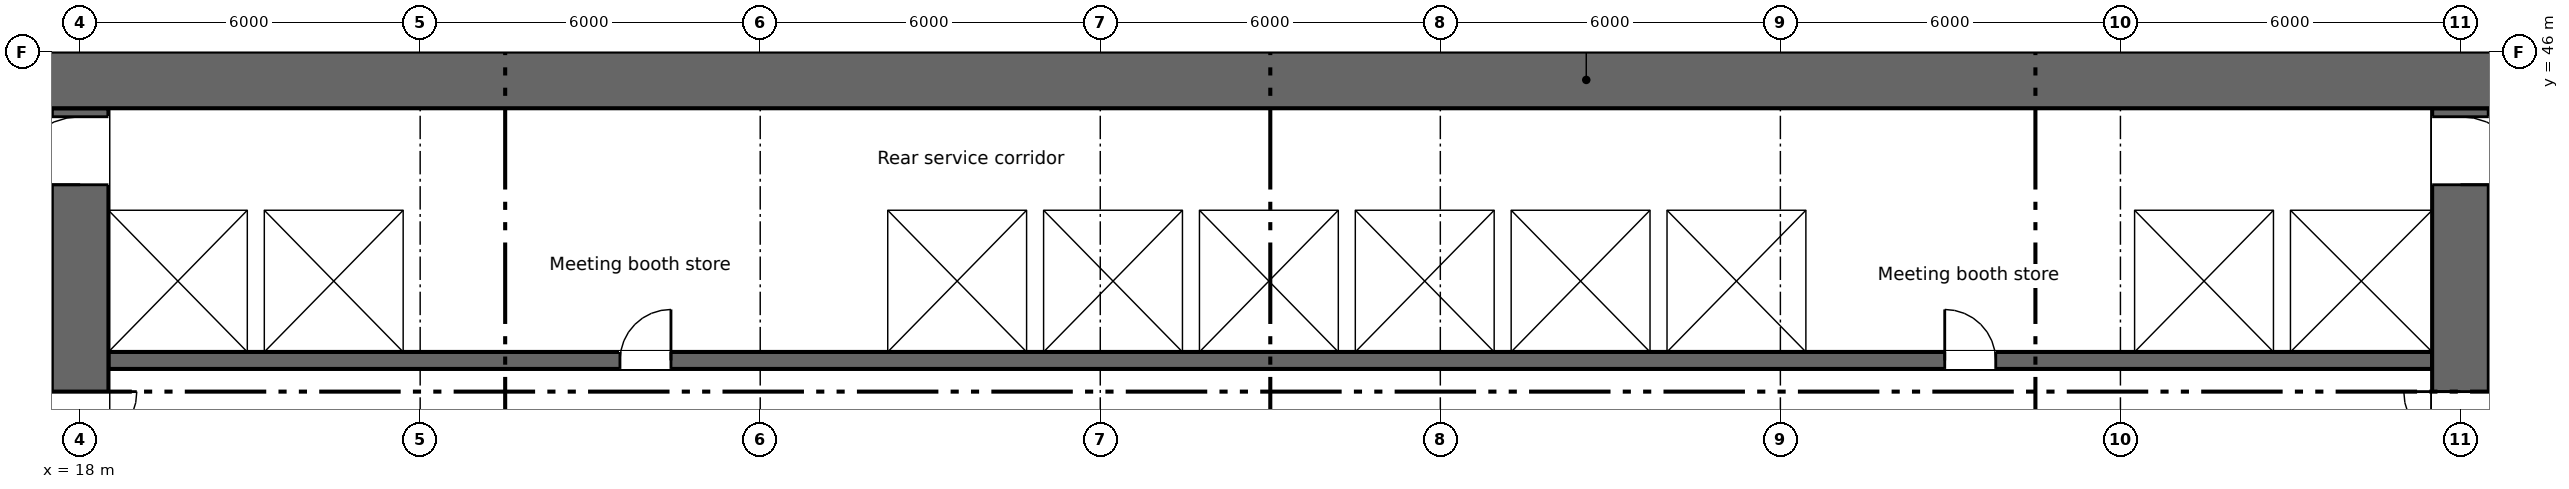
"""IFC4 building model, lengths in metres.
Left out: names, types, materials, properties, quantities, classifications, styles, units other than length and angle.
Written with IfcOpenShell. Run it as: python <this file> out.ifc"""

import sys

from ifc_helpers import new_model, si_unit, direction, frame, frame_2d, origin, place, context, subcontext, project, spatial, rectangle, extrude, element, fill, save


model = new_model("IFC4")
c1 = context("Model", 3, precision=1e-05, world=origin(), true_north=direction((0.0, 1.0)))
c2 = subcontext(c1, "Body", "Model", "MODEL_VIEW")
j1 = project(units=[si_unit("LENGTHUNIT", "METRE"), si_unit("PLANEANGLEUNIT", "RADIAN")], contexts=[c1])
p1 = place(None, origin())
s1 = spatial("IfcSite", under=j1, at=p1, CompositionType="ELEMENT")
p2 = place(p1, origin())
s2 = spatial("IfcBuilding", under=s1, at=p2, CompositionType="ELEMENT")
p3 = place(p2, frame((0.0, 0.0, 71.25)))
s3 = spatial("IfcBuildingStorey", under=s2, at=p3, CompositionType="ELEMENT", Elevation=71.25)
p4 = place(p3, frame((5.55, 45.5, 0.0), z_axis=(0.0, 0.0, 1.0), x_axis=(1.0, 0.0, 0.0)))
e1 = element("IfcWall", 1, at=p4, inside=s3, PredefinedType="SHEAR", context=c2, shape_type="SweptSolid", body=[
    extrude(rectangle(XDim=66.9, YDim=1.0, at=frame_2d((33.45, 0.0))), origin(), (0.0, 0.0, 1.0), 3.35),
])
p5 = place(p4, frame((1.2, 0.0, 0.6)))
e2 = element("IfcOpeningElement", 2, at=p5, cuts=e1, PredefinedType="OPENING", context=c2, shape_type="SweptSolid", body=[
    extrude(rectangle(XDim=0.6, YDim=2.4, at=frame_2d((0.3, 1.2))), frame((0.0, 0.51, 0.0), z_axis=(0.0, -1.0, 0.0), x_axis=(1.0, 0.0, 0.0)), (0.0, 0.0, 1.0), 1.02),
])
p6 = place(p4, frame((7.2, 0.0, 0.6)))
e3 = element("IfcOpeningElement", 3, at=p6, cuts=e1, PredefinedType="OPENING", context=c2, shape_type="SweptSolid", body=[
    extrude(rectangle(XDim=0.6, YDim=2.4, at=frame_2d((0.3, 1.2))), frame((0.0, 0.51, 0.0), z_axis=(0.0, -1.0, 0.0), x_axis=(1.0, 0.0, 0.0)), (0.0, 0.0, 1.0), 1.02),
])
p7 = place(p4, frame((61.2, 0.0, 0.6)))
e4 = element("IfcOpeningElement", 4, at=p7, cuts=e1, PredefinedType="OPENING", context=c2, shape_type="SweptSolid", body=[
    extrude(rectangle(XDim=0.6, YDim=2.4, at=frame_2d((0.3, 1.2))), frame((0.0, 0.51, 0.0), z_axis=(0.0, -1.0, 0.0), x_axis=(1.0, 0.0, 0.0)), (0.0, 0.0, 1.0), 1.02),
])
p8 = place(p3, frame((18.0, 28.4, 0.0), z_axis=(0.0, 0.0, 1.0), x_axis=(0.0, 1.0, 0.0)))
e5 = element("IfcWall", 5, at=p8, inside=s3, PredefinedType="SHEAR", context=c2, shape_type="SweptSolid", body=[
    extrude(rectangle(XDim=16.6, YDim=1.0, at=frame_2d((8.3, 0.0))), origin(), (0.0, 0.0, 1.0), 3.35),
])
p9 = place(p8, frame((9.6, 0.0, 0.0)))
e6 = element("IfcOpeningElement", 6, at=p9, cuts=e5, PredefinedType="OPENING", context=c2, shape_type="SweptSolid", body=[
    extrude(rectangle(XDim=2.0, YDim=2.1, at=frame_2d((1.0, 1.05))), frame((0.0, 0.51, 0.0), z_axis=(0.0, -1.0, 0.0), x_axis=(1.0, 0.0, 0.0)), (0.0, 0.0, 1.0), 1.02),
])
p10 = place(p8, frame((15.25, 0.0, 0.0)))
e7 = element("IfcOpeningElement", 7, at=p10, cuts=e5, PredefinedType="OPENING", context=c2, shape_type="SweptSolid", body=[
    extrude(rectangle(XDim=1.2, YDim=2.1, at=frame_2d((0.6, 1.05))), frame((0.0, 0.51, 0.0), z_axis=(0.0, -1.0, 0.0), x_axis=(1.0, 0.0, 0.0)), (0.0, 0.0, 1.0), 1.02),
])
p11 = place(p3, frame((60.0, 28.4, 0.0), z_axis=(0.0, 0.0, 1.0), x_axis=(0.0, 1.0, 0.0)))
e8 = element("IfcWall", 8, at=p11, inside=s3, PredefinedType="SHEAR", context=c2, shape_type="SweptSolid", body=[
    extrude(rectangle(XDim=16.6, YDim=1.0, at=frame_2d((8.3, 0.0))), origin(), (0.0, 0.0, 1.0), 3.35),
])
p12 = place(p11, frame((9.6, 0.0, 0.0)))
e9 = element("IfcOpeningElement", 9, at=p12, cuts=e8, PredefinedType="OPENING", context=c2, shape_type="SweptSolid", body=[
    extrude(rectangle(XDim=2.0, YDim=2.1, at=frame_2d((1.0, 1.05))), frame((0.0, 0.51, 0.0), z_axis=(0.0, -1.0, 0.0), x_axis=(1.0, 0.0, 0.0)), (0.0, 0.0, 1.0), 1.02),
])
p13 = place(p11, frame((15.25, 0.0, 0.0)))
e10 = element("IfcOpeningElement", 10, at=p13, cuts=e8, PredefinedType="OPENING", context=c2, shape_type="SweptSolid", body=[
    extrude(rectangle(XDim=1.2, YDim=2.1, at=frame_2d((0.6, 1.05))), frame((0.0, 0.51, 0.0), z_axis=(0.0, -1.0, 0.0), x_axis=(1.0, 0.0, 0.0)), (0.0, 0.0, 1.0), 1.02),
])
p14 = place(p3, frame((18.5, 40.55, 0.0), z_axis=(0.0, 0.0, 1.0), x_axis=(1.0, 0.0, 0.0)))
e11 = element("IfcWall", 11, at=p14, inside=s3, PredefinedType="SHEAR", context=c2, shape_type="SweptSolid", body=[
    extrude(rectangle(XDim=41.0, YDim=0.3, at=frame_2d((20.5, 0.0))), origin(), (0.0, 0.0, 1.0), 3.35),
])
p15 = place(p14, frame((9.025, 0.0, 0.0)))
e12 = element("IfcOpeningElement", 12, at=p15, cuts=e11, PredefinedType="OPENING", context=c2, shape_type="SweptSolid", body=[
    extrude(rectangle(XDim=0.9, YDim=2.1, at=frame_2d((0.45, 1.05))), frame((0.0, 0.16, 0.0), z_axis=(0.0, -1.0, 0.0), x_axis=(1.0, 0.0, 0.0)), (0.0, 0.0, 1.0), 0.32),
])
p16 = place(p14, frame((32.4, 0.0, 0.0)))
e13 = element("IfcOpeningElement", 13, at=p16, cuts=e11, PredefinedType="OPENING", context=c2, shape_type="SweptSolid", body=[
    extrude(rectangle(XDim=0.9, YDim=2.1, at=frame_2d((0.45, 1.05))), frame((0.0, 0.16, 0.0), z_axis=(0.0, -1.0, 0.0), x_axis=(1.0, 0.0, 0.0)), (0.0, 0.0, 1.0), 0.32),
])
p17 = place(p14, frame((14.425, 0.0, 0.0)))
e14 = element("IfcOpeningElement", 14, at=p17, cuts=e11, PredefinedType="OPENING", context=c2, shape_type="SweptSolid", body=[
    extrude(rectangle(XDim=1.1, YDim=2.1, at=frame_2d((0.55, 1.05))), frame((0.0, 0.16, 0.0), z_axis=(0.0, -1.0, 0.0), x_axis=(1.0, 0.0, 0.0)), (0.0, 0.0, 1.0), 0.32),
])
p18 = place(p14, frame((17.175, 0.0, 0.0)))
e15 = element("IfcOpeningElement", 15, at=p18, cuts=e11, PredefinedType="OPENING", context=c2, shape_type="SweptSolid", body=[
    extrude(rectangle(XDim=1.1, YDim=2.1, at=frame_2d((0.55, 1.05))), frame((0.0, 0.16, 0.0), z_axis=(0.0, -1.0, 0.0), x_axis=(1.0, 0.0, 0.0)), (0.0, 0.0, 1.0), 0.32),
])
p19 = place(p14, frame((19.925, 0.0, 0.0)))
e16 = element("IfcOpeningElement", 16, at=p19, cuts=e11, PredefinedType="OPENING", context=c2, shape_type="SweptSolid", body=[
    extrude(rectangle(XDim=1.1, YDim=2.1, at=frame_2d((0.55, 1.05))), frame((0.0, 0.16, 0.0), z_axis=(0.0, -1.0, 0.0), x_axis=(1.0, 0.0, 0.0)), (0.0, 0.0, 1.0), 0.32),
])
p20 = place(p14, frame((22.675, 0.0, 0.0)))
e17 = element("IfcOpeningElement", 17, at=p20, cuts=e11, PredefinedType="OPENING", context=c2, shape_type="SweptSolid", body=[
    extrude(rectangle(XDim=1.1, YDim=2.1, at=frame_2d((0.55, 1.05))), frame((0.0, 0.16, 0.0), z_axis=(0.0, -1.0, 0.0), x_axis=(1.0, 0.0, 0.0)), (0.0, 0.0, 1.0), 0.32),
])
p21 = place(p14, frame((36.375, 0.0, 0.0)))
e18 = element("IfcOpeningElement", 18, at=p21, cuts=e11, PredefinedType="OPENING", context=c2, shape_type="SweptSolid", body=[
    extrude(rectangle(XDim=1.2, YDim=2.1, at=frame_2d((0.6, 1.05))), frame((0.0, 0.16, 0.0), z_axis=(0.0, -1.0, 0.0), x_axis=(1.0, 0.0, 0.0)), (0.0, 0.0, 1.0), 0.32),
])
p22 = place(p14, frame((39.15, 0.0, 0.0)))
e19 = element("IfcOpeningElement", 19, at=p22, cuts=e11, PredefinedType="OPENING", context=c2, shape_type="SweptSolid", body=[
    extrude(rectangle(XDim=1.2, YDim=2.1, at=frame_2d((0.6, 1.05))), frame((0.0, 0.16, 0.0), z_axis=(0.0, -1.0, 0.0), x_axis=(1.0, 0.0, 0.0)), (0.0, 0.0, 1.0), 0.32),
])
p23 = place(p3, frame((18.5, 43.35, 0.0), z_axis=(0.0, 0.0, 1.0), x_axis=(1.0, 0.0, 0.0)))
e20 = element("IfcWall", 20, at=p23, inside=s3, PredefinedType="SHEAR", context=c2, shape_type="SweptSolid", body=[
    extrude(rectangle(XDim=41.0, YDim=0.3, at=frame_2d((20.5, 0.0))), origin(), (0.0, 0.0, 1.0), 3.35),
])
for number, where, z_axis, x_axis in (
    (21, (21.1, 40.7, 0.0), (0.0, 0.0, 1.0), (0.0, 1.0, 0.0)),
    (22, (23.85, 40.7, 0.0), (0.0, 0.0, 1.0), (0.0, 1.0, 0.0)),
    (23, (32.1, 40.7, 0.0), (0.0, 0.0, 1.0), (0.0, 1.0, 0.0)),
    (24, (34.85, 40.7, 0.0), (0.0, 0.0, 1.0), (0.0, 1.0, 0.0)),
    (25, (37.6, 40.7, 0.0), (0.0, 0.0, 1.0), (0.0, 1.0, 0.0)),
    (26, (40.35, 40.7, 0.0), (0.0, 0.0, 1.0), (0.0, 1.0, 0.0)),
    (27, (43.1, 40.7, 0.0), (0.0, 0.0, 1.0), (0.0, 1.0, 0.0)),
    (28, (45.85, 40.7, 0.0), (0.0, 0.0, 1.0), (0.0, 1.0, 0.0)),
    (29, (48.6, 40.7, 0.0), (0.0, 0.0, 1.0), (0.0, 1.0, 0.0)),
    (30, (54.1, 40.7, 0.0), (0.0, 0.0, 1.0), (0.0, 1.0, 0.0)),
    (31, (56.85, 40.7, 0.0), (0.0, 0.0, 1.0), (0.0, 1.0, 0.0)),
):
    element("IfcWall", number, at=place(p3, frame(where, z_axis=z_axis, x_axis=x_axis)), inside=s3, PredefinedType="SHEAR", context=c2, shape_type="SweptSolid", body=[
        extrude(rectangle(XDim=2.5, YDim=0.3, at=frame_2d((1.25, 0.0))), origin(), (0.0, 0.0, 1.0), 3.35),
    ])
p24 = place(p15, origin())
e32 = element("IfcDoor", 32, at=p24, inside=s3, OperationType="SINGLE_SWING_RIGHT", PredefinedType="DOOR", context=c2, shape_type="SweptSolid", body=[
    extrude(rectangle(XDim=0.9, YDim=2.1, at=frame_2d((0.45, 1.05))), frame((0.0, 0.025, 0.0), z_axis=(0.0, -1.0, 0.0), x_axis=(1.0, 0.0, 0.0)), (0.0, 0.0, 1.0), 0.05),
])
fill(e12, e32)
p25 = place(p16, origin())
e33 = element("IfcDoor", 33, at=p25, inside=s3, OperationType="SINGLE_SWING_LEFT", PredefinedType="DOOR", context=c2, shape_type="SweptSolid", body=[
    extrude(rectangle(XDim=0.9, YDim=2.1, at=frame_2d((0.45, 1.05))), frame((0.0, 0.025, 0.0), z_axis=(0.0, -1.0, 0.0), x_axis=(1.0, 0.0, 0.0)), (0.0, 0.0, 1.0), 0.05),
])
fill(e13, e33)
p26 = place(p17, origin())
e34 = element("IfcDoor", 34, at=p26, inside=s3, OperationType="SLIDING_TO_LEFT", PredefinedType="DOOR", context=c2, shape_type="SweptSolid", body=[
    extrude(rectangle(XDim=1.1, YDim=2.1, at=frame_2d((0.55, 1.05))), frame((0.0, 0.025, 0.0), z_axis=(0.0, -1.0, 0.0), x_axis=(1.0, 0.0, 0.0)), (0.0, 0.0, 1.0), 0.05),
])
fill(e14, e34)
p27 = place(p18, origin())
e35 = element("IfcDoor", 35, at=p27, inside=s3, OperationType="SLIDING_TO_LEFT", PredefinedType="DOOR", context=c2, shape_type="SweptSolid", body=[
    extrude(rectangle(XDim=1.1, YDim=2.1, at=frame_2d((0.55, 1.05))), frame((0.0, 0.025, 0.0), z_axis=(0.0, -1.0, 0.0), x_axis=(1.0, 0.0, 0.0)), (0.0, 0.0, 1.0), 0.05),
])
fill(e15, e35)
p28 = place(p19, origin())
e36 = element("IfcDoor", 36, at=p28, inside=s3, OperationType="SLIDING_TO_LEFT", PredefinedType="DOOR", context=c2, shape_type="SweptSolid", body=[
    extrude(rectangle(XDim=1.1, YDim=2.1, at=frame_2d((0.55, 1.05))), frame((0.0, 0.025, 0.0), z_axis=(0.0, -1.0, 0.0), x_axis=(1.0, 0.0, 0.0)), (0.0, 0.0, 1.0), 0.05),
])
fill(e16, e36)
p29 = place(p20, origin())
e37 = element("IfcDoor", 37, at=p29, inside=s3, OperationType="SLIDING_TO_LEFT", PredefinedType="DOOR", context=c2, shape_type="SweptSolid", body=[
    extrude(rectangle(XDim=1.1, YDim=2.1, at=frame_2d((0.55, 1.05))), frame((0.0, 0.025, 0.0), z_axis=(0.0, -1.0, 0.0), x_axis=(1.0, 0.0, 0.0)), (0.0, 0.0, 1.0), 0.05),
])
fill(e17, e37)
p30 = place(p21, origin())
e38 = element("IfcDoor", 38, at=p30, inside=s3, OperationType="SLIDING_TO_LEFT", PredefinedType="DOOR", context=c2, shape_type="SweptSolid", body=[
    extrude(rectangle(XDim=1.2, YDim=2.1, at=frame_2d((0.6, 1.05))), frame((0.0, 0.025, 0.0), z_axis=(0.0, -1.0, 0.0), x_axis=(1.0, 0.0, 0.0)), (0.0, 0.0, 1.0), 0.05),
])
fill(e18, e38)
p31 = place(p22, origin())
e39 = element("IfcDoor", 39, at=p31, inside=s3, OperationType="SLIDING_TO_LEFT", PredefinedType="DOOR", context=c2, shape_type="SweptSolid", body=[
    extrude(rectangle(XDim=1.2, YDim=2.1, at=frame_2d((0.6, 1.05))), frame((0.0, 0.025, 0.0), z_axis=(0.0, -1.0, 0.0), x_axis=(1.0, 0.0, 0.0)), (0.0, 0.0, 1.0), 0.05),
])
fill(e19, e39)
p32 = place(p9, origin())
e40 = element("IfcDoor", 40, at=p32, inside=s3, OperationType="DOUBLE_DOOR_SINGLE_SWING", PredefinedType="DOOR", context=c2, shape_type="SweptSolid", body=[
    extrude(rectangle(XDim=2.0, YDim=2.1, at=frame_2d((1.0, 1.05))), frame((0.0, 0.025, 0.0), z_axis=(0.0, -1.0, 0.0), x_axis=(1.0, 0.0, 0.0)), (0.0, 0.0, 1.0), 0.05),
])
fill(e6, e40)
p33 = place(p12, origin())
e41 = element("IfcDoor", 41, at=p33, inside=s3, OperationType="DOUBLE_DOOR_SINGLE_SWING", PredefinedType="DOOR", context=c2, shape_type="SweptSolid", body=[
    extrude(rectangle(XDim=2.0, YDim=2.1, at=frame_2d((1.0, 1.05))), frame((0.0, 0.025, 0.0), z_axis=(0.0, -1.0, 0.0), x_axis=(1.0, 0.0, 0.0)), (0.0, 0.0, 1.0), 0.05),
])
fill(e9, e41)
p34 = place(p10, origin())
e42 = element("IfcDoor", 42, at=p34, inside=s3, OperationType="SINGLE_SWING_LEFT", PredefinedType="DOOR", context=c2, shape_type="SweptSolid", body=[
    extrude(rectangle(XDim=1.2, YDim=2.1, at=frame_2d((0.6, 1.05))), frame((0.0, 0.025, 0.0), z_axis=(0.0, -1.0, 0.0), x_axis=(1.0, 0.0, 0.0)), (0.0, 0.0, 1.0), 0.05),
])
fill(e7, e42)
p35 = place(p13, origin())
e43 = element("IfcDoor", 43, at=p35, inside=s3, OperationType="SINGLE_SWING_LEFT", PredefinedType="DOOR", context=c2, shape_type="SweptSolid", body=[
    extrude(rectangle(XDim=1.2, YDim=2.1, at=frame_2d((0.6, 1.05))), frame((0.0, 0.025, 0.0), z_axis=(0.0, -1.0, 0.0), x_axis=(1.0, 0.0, 0.0)), (0.0, 0.0, 1.0), 0.05),
])
fill(e10, e43)
save(model, sys.argv[1])
